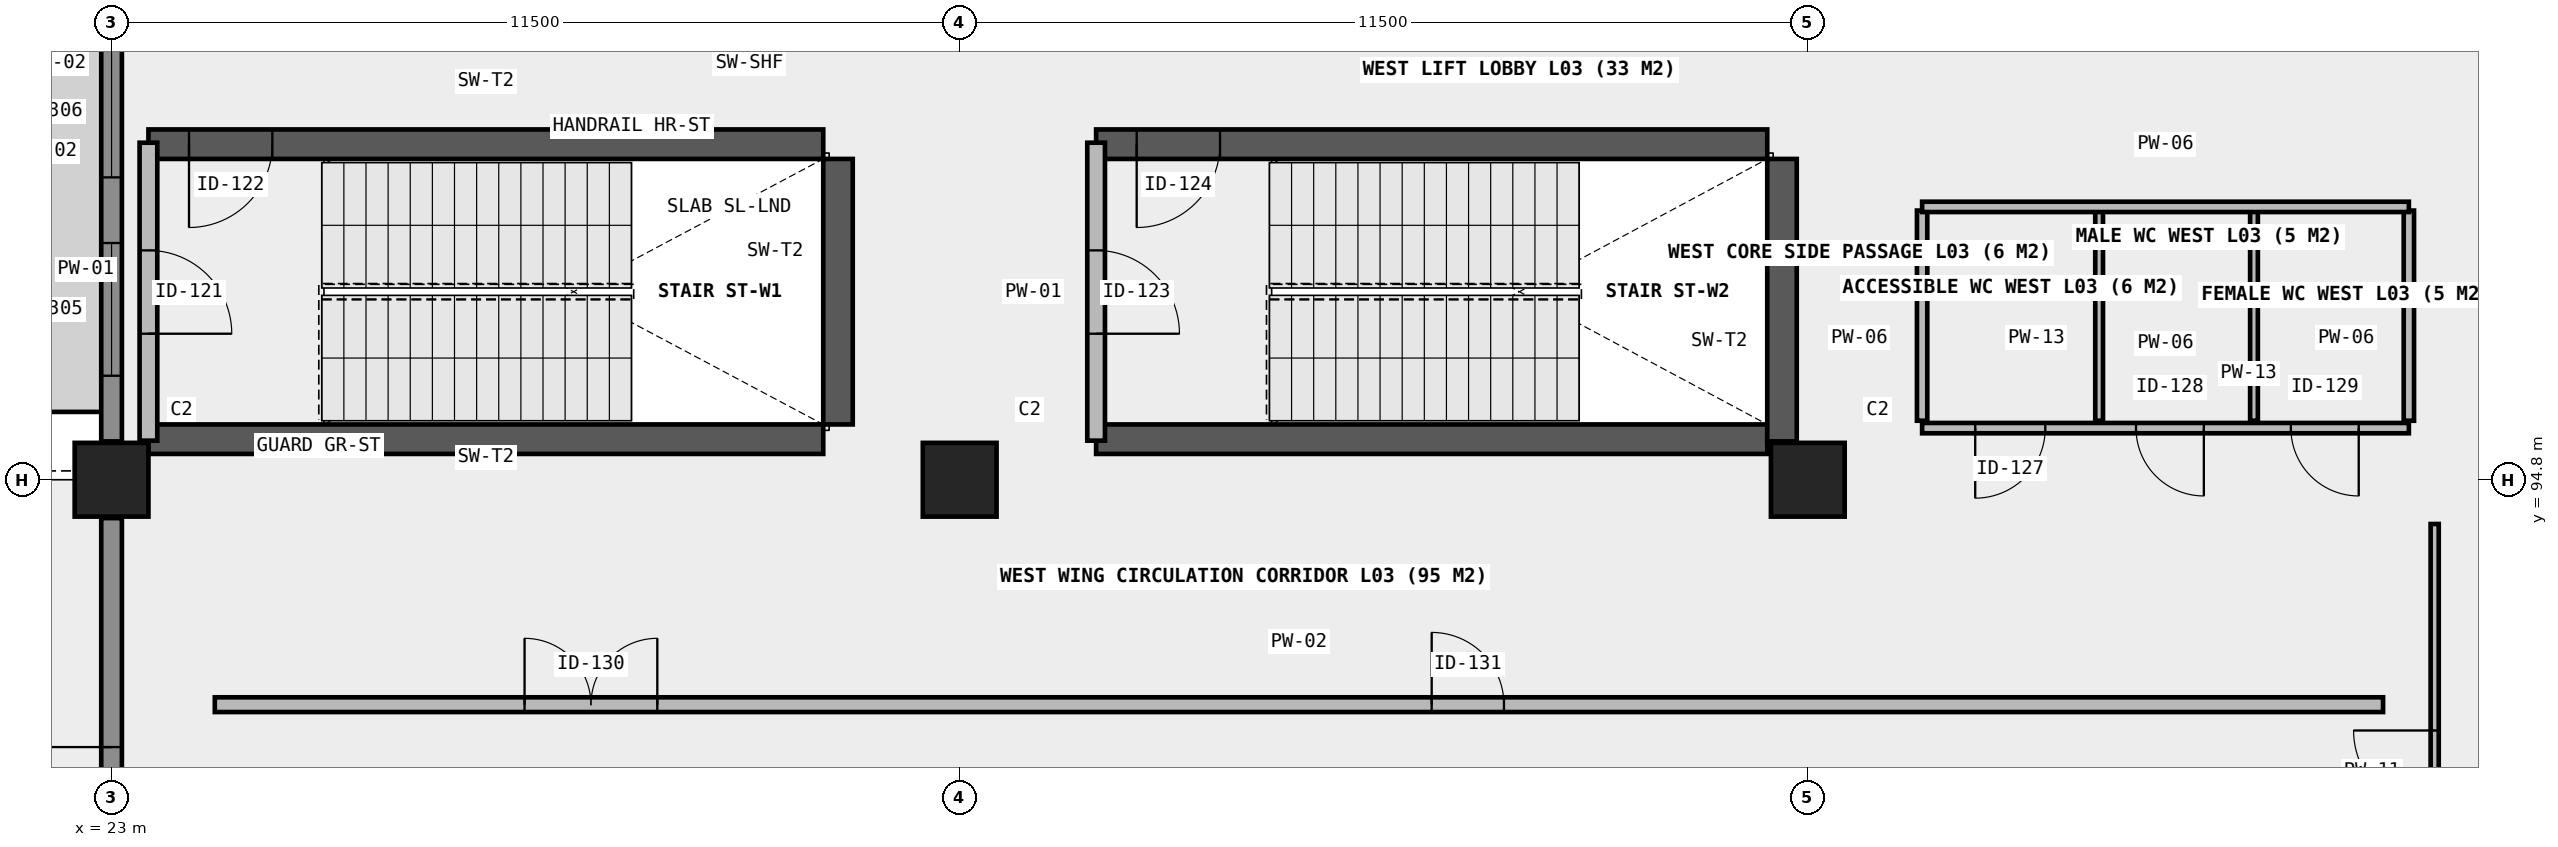
"""IFC4 building model, lengths in metres.
Left out: names, types, materials, properties, quantities, classifications, styles, units other than length and angle.
Written with IfcOpenShell. Run it as: python <this file> out.ifc"""

import sys

from ifc_helpers import new_model, si_unit, direction, frame, frame_2d, origin, origin_2d, place, context, subcontext, project, spatial, rectangle, extrude, element, fill, save


model = new_model("IFC4")
c1 = context("Model", 3, precision=1e-05, world=origin(), true_north=direction((0.0, 1.0)))
c2 = subcontext(c1, "Body", "Model", "MODEL_VIEW")
j1 = project(units=[si_unit("LENGTHUNIT", "METRE"), si_unit("PLANEANGLEUNIT", "RADIAN")], contexts=[c1])
p1 = place(None, origin())
s1 = spatial("IfcSite", under=j1, at=p1, CompositionType="ELEMENT")
p2 = place(p1, origin())
s2 = spatial("IfcBuilding", under=s1, at=p2, CompositionType="ELEMENT")
p3 = place(p2, frame((0.0, 0.0, 13.8)))
s3 = spatial("IfcBuildingStorey", under=s2, at=p3, CompositionType="ELEMENT", Elevation=13.8)
for number, where, z_axis, x_axis in (
    (1, (23.0, 94.8, 0.0), (0.0, 0.0, 1.0), (1.0, 0.0, 0.0)),
    (2, (34.5, 94.8, 0.0), (0.0, 0.0, 1.0), (1.0, 0.0, 0.0)),
    (3, (46.0, 94.8, 0.0), (0.0, 0.0, 1.0), (1.0, 0.0, 0.0)),
):
    element("IfcColumn", number, at=place(p3, frame(where, z_axis=z_axis, x_axis=x_axis)), inside=s3, PredefinedType="COLUMN", context=c2, shape_type="SweptSolid", body=[
        extrude(rectangle(XDim=1.0, YDim=1.0, at=origin_2d()), origin(), (0.0, 0.0, 1.0), 4.5),
    ])
p4 = place(p3, frame((23.5, 95.35, 0.0), z_axis=(0.0, 0.0, 1.0), x_axis=(1.0, 0.0, 0.0)))
e4 = element("IfcWall", 4, at=p4, inside=s3, PredefinedType="SHEAR", context=c2, shape_type="SweptSolid", body=[
    extrude(rectangle(XDim=9.15, YDim=0.4, at=frame_2d((4.575, 0.0))), origin(), (0.0, 0.0, 1.0), 4.5),
])
p5 = place(p3, frame((23.5, 99.35, 0.0), z_axis=(0.0, 0.0, 1.0), x_axis=(1.0, 0.0, 0.0)))
e5 = element("IfcWall", 5, at=p5, inside=s3, PredefinedType="SHEAR", context=c2, shape_type="SweptSolid", body=[
    extrude(rectangle(XDim=9.15, YDim=0.4, at=frame_2d((4.575, 0.0))), origin(), (0.0, 0.0, 1.0), 4.5),
])
p6 = place(p5, frame((0.55, 0.0, 0.0)))
e6 = element("IfcOpeningElement", 6, at=p6, cuts=e5, PredefinedType="OPENING", context=c2, shape_type="SweptSolid", body=[
    extrude(rectangle(XDim=1.13, YDim=2.15, at=frame_2d((0.565, 1.075))), frame((0.0, 0.21, 0.0), z_axis=(0.0, -1.0, 0.0), x_axis=(1.0, 0.0, 0.0)), (0.0, 0.0, 1.0), 0.42),
])
p7 = place(p3, frame((32.85, 95.55, 0.0), z_axis=(0.0, 0.0, 1.0), x_axis=(0.0, 1.0, 0.0)))
e7 = element("IfcWall", 7, at=p7, inside=s3, PredefinedType="SHEAR", context=c2, shape_type="SweptSolid", body=[
    extrude(rectangle(XDim=3.6, YDim=0.4, at=frame_2d((1.8, 0.0))), origin(), (0.0, 0.0, 1.0), 4.5),
])
p8 = place(p3, frame((36.35, 95.35, 0.0), z_axis=(0.0, 0.0, 1.0), x_axis=(1.0, 0.0, 0.0)))
e8 = element("IfcWall", 8, at=p8, inside=s3, PredefinedType="SHEAR", context=c2, shape_type="SweptSolid", body=[
    extrude(rectangle(XDim=9.1, YDim=0.4, at=frame_2d((4.55, 0.0))), origin(), (0.0, 0.0, 1.0), 4.5),
])
p9 = place(p3, frame((36.35, 99.35, 0.0), z_axis=(0.0, 0.0, 1.0), x_axis=(1.0, 0.0, 0.0)))
e9 = element("IfcWall", 9, at=p9, inside=s3, PredefinedType="SHEAR", context=c2, shape_type="SweptSolid", body=[
    extrude(rectangle(XDim=9.1, YDim=0.4, at=frame_2d((4.55, 0.0))), origin(), (0.0, 0.0, 1.0), 4.5),
])
p10 = place(p9, frame((0.55, 0.0, 0.0)))
e10 = element("IfcOpeningElement", 10, at=p10, cuts=e9, PredefinedType="OPENING", context=c2, shape_type="SweptSolid", body=[
    extrude(rectangle(XDim=1.13, YDim=2.15, at=frame_2d((0.565, 1.075))), frame((0.0, 0.21, 0.0), z_axis=(0.0, -1.0, 0.0), x_axis=(1.0, 0.0, 0.0)), (0.0, 0.0, 1.0), 0.42),
])
p11 = place(p3, frame((45.65, 95.32, 0.0), z_axis=(0.0, 0.0, 1.0), x_axis=(0.0, 1.0, 0.0)))
e11 = element("IfcWall", 11, at=p11, inside=s3, PredefinedType="SHEAR", context=c2, shape_type="SweptSolid", body=[
    extrude(rectangle(XDim=3.83, YDim=0.4, at=frame_2d((1.915, 0.0))), origin(), (0.0, 0.0, 1.0), 4.5),
])
p12 = place(p3, frame((23.0, 86.27, 0.0), z_axis=(0.0, 0.0, 1.0), x_axis=(0.0, 1.0, 0.0)))
e12 = element("IfcWall", 12, at=p12, inside=s3, PredefinedType="SOLIDWALL", context=c2, shape_type="SweptSolid", body=[
    extrude(rectangle(XDim=8.01, YDim=0.28, at=frame_2d((4.005, 0.0))), origin(), (0.0, 0.0, 1.0), 3.45),
])
p13 = place(p12, frame((3.105, 0.0, 0.0)))
e13 = element("IfcOpeningElement", 13, at=p13, cuts=e12, PredefinedType="OPENING", context=c2, shape_type="SweptSolid", body=[
    extrude(rectangle(XDim=1.8, YDim=2.25, at=frame_2d((0.9, 1.125))), frame((0.0, 0.15, 0.0), z_axis=(0.0, -1.0, 0.0), x_axis=(1.0, 0.0, 0.0)), (0.0, 0.0, 1.0), 0.3),
])
p14 = place(p3, frame((23.0, 95.32, 0.0), z_axis=(0.0, 0.0, 1.0), x_axis=(0.0, 1.0, 0.0)))
e14 = element("IfcWall", 14, at=p14, inside=s3, PredefinedType="SOLIDWALL", context=c2, shape_type="SweptSolid", body=[
    extrude(rectangle(XDim=8.96, YDim=0.28, at=frame_2d((4.48, 0.0))), origin(), (0.0, 0.0, 1.0), 3.45),
])
p15 = place(p14, frame((0.89, 0.0, 0.85)))
e15 = element("IfcOpeningElement", 15, at=p15, cuts=e14, PredefinedType="OPENING", context=c2, shape_type="SweptSolid", body=[
    extrude(rectangle(XDim=1.8, YDim=1.95, at=frame_2d((0.9, 0.975))), frame((0.0, 0.15, 0.0), z_axis=(0.0, -1.0, 0.0), x_axis=(1.0, 0.0, 0.0)), (0.0, 0.0, 1.0), 0.3),
])
p16 = place(p14, frame((3.58, 0.0, 0.85)))
e16 = element("IfcOpeningElement", 16, at=p16, cuts=e14, PredefinedType="OPENING", context=c2, shape_type="SweptSolid", body=[
    extrude(rectangle(XDim=1.8, YDim=1.95, at=frame_2d((0.9, 0.975))), frame((0.0, 0.15, 0.0), z_axis=(0.0, -1.0, 0.0), x_axis=(1.0, 0.0, 0.0)), (0.0, 0.0, 1.0), 0.3),
])
p17 = place(p14, frame((6.27, 0.0, 0.85)))
e17 = element("IfcOpeningElement", 17, at=p17, cuts=e14, PredefinedType="OPENING", context=c2, shape_type="SweptSolid", body=[
    extrude(rectangle(XDim=1.8, YDim=1.95, at=frame_2d((0.9, 0.975))), frame((0.0, 0.15, 0.0), z_axis=(0.0, -1.0, 0.0), x_axis=(1.0, 0.0, 0.0)), (0.0, 0.0, 1.0), 0.3),
])
p18 = place(p3, frame((23.5, 95.33, 0.0), z_axis=(0.0, 0.0, 1.0), x_axis=(0.0, 1.0, 0.0)))
e18 = element("IfcWall", 18, at=p18, inside=s3, PredefinedType="SOLIDWALL", context=c2, shape_type="SweptSolid", body=[
    extrude(rectangle(XDim=4.04, YDim=0.24, at=frame_2d((2.02, 0.0))), origin(), (0.0, 0.0, 1.0), 4.22),
])
p19 = place(p18, frame((1.45, 0.0, 0.0)))
e19 = element("IfcOpeningElement", 19, at=p19, cuts=e18, PredefinedType="OPENING", context=c2, shape_type="SweptSolid", body=[
    extrude(rectangle(XDim=1.13, YDim=2.15, at=frame_2d((0.565, 1.075))), frame((0.0, 0.13, 0.0), z_axis=(0.0, -1.0, 0.0), x_axis=(1.0, 0.0, 0.0)), (0.0, 0.0, 1.0), 0.26),
])
p20 = place(p3, frame((36.35, 95.33, 0.0), z_axis=(0.0, 0.0, 1.0), x_axis=(0.0, 1.0, 0.0)))
e20 = element("IfcWall", 20, at=p20, inside=s3, PredefinedType="SOLIDWALL", context=c2, shape_type="SweptSolid", body=[
    extrude(rectangle(XDim=4.04, YDim=0.24, at=frame_2d((2.02, 0.0))), origin(), (0.0, 0.0, 1.0), 4.22),
])
p21 = place(p20, frame((1.45, 0.0, 0.0)))
e21 = element("IfcOpeningElement", 21, at=p21, cuts=e20, PredefinedType="OPENING", context=c2, shape_type="SweptSolid", body=[
    extrude(rectangle(XDim=1.13, YDim=2.15, at=frame_2d((0.565, 1.075))), frame((0.0, 0.13, 0.0), z_axis=(0.0, -1.0, 0.0), x_axis=(1.0, 0.0, 0.0)), (0.0, 0.0, 1.0), 0.26),
])
p22 = place(p3, frame((47.55, 95.5, 0.0), z_axis=(0.0, 0.0, 1.0), x_axis=(1.0, 0.0, 0.0)))
e22 = element("IfcWall", 22, at=p22, inside=s3, PredefinedType="PLUMBINGWALL", context=c2, shape_type="SweptSolid", body=[
    extrude(rectangle(XDim=6.6, YDim=0.14, at=frame_2d((3.3, 0.0))), origin(), (0.0, 0.0, 1.0), 4.22),
])
p23 = place(p22, frame((0.72, 0.0, 0.0)))
e23 = element("IfcOpeningElement", 23, at=p23, cuts=e22, PredefinedType="OPENING", context=c2, shape_type="SweptSolid", body=[
    extrude(rectangle(XDim=0.95, YDim=2.1, at=frame_2d((0.475, 1.05))), frame((0.0, 0.08, 0.0), z_axis=(0.0, -1.0, 0.0), x_axis=(1.0, 0.0, 0.0)), (0.0, 0.0, 1.0), 0.16),
])
p24 = place(p22, frame((2.9, 0.0, 0.0)))
e24 = element("IfcOpeningElement", 24, at=p24, cuts=e22, PredefinedType="OPENING", context=c2, shape_type="SweptSolid", body=[
    extrude(rectangle(XDim=0.92, YDim=2.1, at=frame_2d((0.46, 1.05))), frame((0.0, 0.08, 0.0), z_axis=(0.0, -1.0, 0.0), x_axis=(1.0, 0.0, 0.0)), (0.0, 0.0, 1.0), 0.16),
])
p25 = place(p22, frame((5.0, 0.0, 0.0)))
e25 = element("IfcOpeningElement", 25, at=p25, cuts=e22, PredefinedType="OPENING", context=c2, shape_type="SweptSolid", body=[
    extrude(rectangle(XDim=0.92, YDim=2.1, at=frame_2d((0.46, 1.05))), frame((0.0, 0.08, 0.0), z_axis=(0.0, -1.0, 0.0), x_axis=(1.0, 0.0, 0.0)), (0.0, 0.0, 1.0), 0.16),
])
p26 = place(p3, frame((47.55, 95.6, 0.0), z_axis=(0.0, 0.0, 1.0), x_axis=(0.0, 1.0, 0.0)))
e26 = element("IfcWall", 26, at=p26, inside=s3, PredefinedType="PLUMBINGWALL", context=c2, shape_type="SweptSolid", body=[
    extrude(rectangle(XDim=2.85, YDim=0.14, at=frame_2d((1.425, 0.0))), origin(), (0.0, 0.0, 1.0), 4.22),
])
p27 = place(p3, frame((49.95, 95.6, 0.0), z_axis=(0.0, 0.0, 1.0), x_axis=(0.0, 1.0, 0.0)))
e27 = element("IfcWall", 27, at=p27, inside=s3, PredefinedType="PARTITIONING", context=c2, shape_type="SweptSolid", body=[
    extrude(rectangle(XDim=2.85, YDim=0.105, at=frame_2d((1.425, 0.0))), origin(), (0.0, 0.0, 1.0), 3.7),
])
p28 = place(p3, frame((52.05, 95.6, 0.0), z_axis=(0.0, 0.0, 1.0), x_axis=(0.0, 1.0, 0.0)))
e28 = element("IfcWall", 28, at=p28, inside=s3, PredefinedType="PARTITIONING", context=c2, shape_type="SweptSolid", body=[
    extrude(rectangle(XDim=2.85, YDim=0.105, at=frame_2d((1.425, 0.0))), origin(), (0.0, 0.0, 1.0), 4.22),
])
p29 = place(p3, frame((54.15, 95.6, 0.0), z_axis=(0.0, 0.0, 1.0), x_axis=(0.0, 1.0, 0.0)))
e29 = element("IfcWall", 29, at=p29, inside=s3, PredefinedType="PLUMBINGWALL", context=c2, shape_type="SweptSolid", body=[
    extrude(rectangle(XDim=2.85, YDim=0.14, at=frame_2d((1.425, 0.0))), origin(), (0.0, 0.0, 1.0), 4.22),
])
p30 = place(p3, frame((47.55, 98.5, 0.0), z_axis=(0.0, 0.0, 1.0), x_axis=(1.0, 0.0, 0.0)))
e30 = element("IfcWall", 30, at=p30, inside=s3, PredefinedType="PLUMBINGWALL", context=c2, shape_type="SweptSolid", body=[
    extrude(rectangle(XDim=6.6, YDim=0.14, at=frame_2d((3.3, 0.0))), origin(), (0.0, 0.0, 1.0), 4.22),
])
p31 = place(p3, frame((24.4, 91.75, 0.0), z_axis=(0.0, 0.0, 1.0), x_axis=(1.0, 0.0, 0.0)))
e31 = element("IfcWall", 31, at=p31, inside=s3, PredefinedType="PARTITIONING", context=c2, shape_type="SweptSolid", body=[
    extrude(rectangle(XDim=29.4, YDim=0.2, at=frame_2d((14.7, 0.0))), origin(), (0.0, 0.0, 1.0), 4.22),
])
p32 = place(p31, frame((4.2, 0.0, 0.0)))
e32 = element("IfcOpeningElement", 32, at=p32, cuts=e31, PredefinedType="OPENING", context=c2, shape_type="SweptSolid", body=[
    extrude(rectangle(XDim=1.8, YDim=2.2, at=frame_2d((0.9, 1.1))), frame((0.0, 0.11, 0.0), z_axis=(0.0, -1.0, 0.0), x_axis=(1.0, 0.0, 0.0)), (0.0, 0.0, 1.0), 0.22),
])
p33 = place(p31, frame((16.5, 0.0, 0.0)))
e33 = element("IfcOpeningElement", 33, at=p33, cuts=e31, PredefinedType="OPENING", context=c2, shape_type="SweptSolid", body=[
    extrude(rectangle(XDim=0.98, YDim=2.15, at=frame_2d((0.49, 1.075))), frame((0.0, 0.11, 0.0), z_axis=(0.0, -1.0, 0.0), x_axis=(1.0, 0.0, 0.0)), (0.0, 0.0, 1.0), 0.22),
])
p34 = place(p3, frame((54.5, 86.4, 0.0), z_axis=(0.0, 0.0, 1.0), x_axis=(0.0, 1.0, 0.0)))
e34 = element("IfcWall", 34, at=p34, inside=s3, PredefinedType="MOVABLE", context=c2, shape_type="SweptSolid", body=[
    extrude(rectangle(XDim=7.8, YDim=0.11, at=frame_2d((3.9, 0.0))), origin(), (0.0, 0.0, 1.0), 4.22),
])
p35 = place(p34, frame((2.8, 0.0, 0.0)))
e35 = element("IfcOpeningElement", 35, at=p35, cuts=e34, PredefinedType="OPENING", context=c2, shape_type="SweptSolid", body=[
    extrude(rectangle(XDim=2.2, YDim=2.4, at=frame_2d((1.1, 1.2))), frame((0.0, 0.065, 0.0), z_axis=(0.0, -1.0, 0.0), x_axis=(1.0, 0.0, 0.0)), (0.0, 0.0, 1.0), 0.13),
])
p36 = place(p13, origin())
e36 = element("IfcDoor", 36, at=p36, inside=s3, OperationType="DOUBLE_DOOR_SINGLE_SWING", PredefinedType="DOOR", context=c2, shape_type="SweptSolid", body=[
    extrude(rectangle(XDim=1.8, YDim=2.25, at=frame_2d((0.9, 1.125))), frame((0.0, 0.025, 0.0), z_axis=(0.0, -1.0, 0.0), x_axis=(1.0, 0.0, 0.0)), (0.0, 0.0, 1.0), 0.05),
])
fill(e13, e36)
p37 = place(p15, origin())
e37 = element("IfcWindow", 37, at=p37, inside=s3, PartitioningType="SINGLE_PANEL", PredefinedType="WINDOW", context=c2, shape_type="SweptSolid", body=[
    extrude(rectangle(XDim=1.8, YDim=1.95, at=frame_2d((0.9, 0.975))), frame((0.0, 0.03, 0.0), z_axis=(0.0, -1.0, 0.0), x_axis=(1.0, 0.0, 0.0)), (0.0, 0.0, 1.0), 0.06),
])
fill(e15, e37)
p38 = place(p16, origin())
e38 = element("IfcWindow", 38, at=p38, inside=s3, PartitioningType="SINGLE_PANEL", PredefinedType="WINDOW", context=c2, shape_type="SweptSolid", body=[
    extrude(rectangle(XDim=1.8, YDim=1.95, at=frame_2d((0.9, 0.975))), frame((0.0, 0.03, 0.0), z_axis=(0.0, -1.0, 0.0), x_axis=(1.0, 0.0, 0.0)), (0.0, 0.0, 1.0), 0.06),
])
fill(e16, e38)
p39 = place(p19, frame((0.565, 0.0, 0.0), z_axis=(0.0, 0.0, 1.0), x_axis=(-1.0, 0.0, 0.0)))
e39 = element("IfcDoor", 39, at=p39, inside=s3, OperationType="SINGLE_SWING_LEFT", PredefinedType="DOOR", context=c2, shape_type="SweptSolid", body=[
    extrude(rectangle(XDim=1.13, YDim=2.15, at=frame_2d((0.0, 1.075))), frame((0.0, 0.025, 0.0), z_axis=(0.0, -1.0, 0.0), x_axis=(1.0, 0.0, 0.0)), (0.0, 0.0, 1.0), 0.05),
])
fill(e19, e39)
p40 = place(p6, frame((0.565, 0.0, 0.0), z_axis=(0.0, 0.0, 1.0), x_axis=(-1.0, 0.0, 0.0)))
e40 = element("IfcDoor", 40, at=p40, inside=s3, OperationType="SINGLE_SWING_LEFT", PredefinedType="DOOR", context=c2, shape_type="SweptSolid", body=[
    extrude(rectangle(XDim=1.13, YDim=2.15, at=frame_2d((0.0, 1.075))), frame((0.0, 0.025, 0.0), z_axis=(0.0, -1.0, 0.0), x_axis=(1.0, 0.0, 0.0)), (0.0, 0.0, 1.0), 0.05),
])
fill(e6, e40)
p41 = place(p21, frame((0.565, 0.0, 0.0), z_axis=(0.0, 0.0, 1.0), x_axis=(-1.0, 0.0, 0.0)))
e41 = element("IfcDoor", 41, at=p41, inside=s3, OperationType="SINGLE_SWING_LEFT", PredefinedType="DOOR", context=c2, shape_type="SweptSolid", body=[
    extrude(rectangle(XDim=1.13, YDim=2.15, at=frame_2d((0.0, 1.075))), frame((0.0, 0.025, 0.0), z_axis=(0.0, -1.0, 0.0), x_axis=(1.0, 0.0, 0.0)), (0.0, 0.0, 1.0), 0.05),
])
fill(e21, e41)
p42 = place(p10, frame((0.565, 0.0, 0.0), z_axis=(0.0, 0.0, 1.0), x_axis=(-1.0, 0.0, 0.0)))
e42 = element("IfcDoor", 42, at=p42, inside=s3, OperationType="SINGLE_SWING_LEFT", PredefinedType="DOOR", context=c2, shape_type="SweptSolid", body=[
    extrude(rectangle(XDim=1.13, YDim=2.15, at=frame_2d((0.0, 1.075))), frame((0.0, 0.025, 0.0), z_axis=(0.0, -1.0, 0.0), x_axis=(1.0, 0.0, 0.0)), (0.0, 0.0, 1.0), 0.05),
])
fill(e10, e42)
p43 = place(p23, frame((0.475, 0.0, 0.0), z_axis=(0.0, 0.0, 1.0), x_axis=(-1.0, 0.0, 0.0)))
e43 = element("IfcDoor", 43, at=p43, inside=s3, OperationType="SINGLE_SWING_LEFT", PredefinedType="DOOR", context=c2, shape_type="SweptSolid", body=[
    extrude(rectangle(XDim=0.95, YDim=2.1, at=frame_2d((0.0, 1.05))), frame((0.0, 0.025, 0.0), z_axis=(0.0, -1.0, 0.0), x_axis=(1.0, 0.0, 0.0)), (0.0, 0.0, 1.0), 0.05),
])
fill(e23, e43)
p44 = place(p24, origin())
e44 = element("IfcDoor", 44, at=p44, inside=s3, OperationType="SINGLE_SWING_RIGHT", PredefinedType="DOOR", context=c2, shape_type="SweptSolid", body=[
    extrude(rectangle(XDim=0.92, YDim=2.1, at=frame_2d((0.46, 1.05))), frame((0.0, 0.025, 0.0), z_axis=(0.0, -1.0, 0.0), x_axis=(1.0, 0.0, 0.0)), (0.0, 0.0, 1.0), 0.05),
])
fill(e24, e44)
p45 = place(p25, origin())
e45 = element("IfcDoor", 45, at=p45, inside=s3, OperationType="SINGLE_SWING_RIGHT", PredefinedType="DOOR", context=c2, shape_type="SweptSolid", body=[
    extrude(rectangle(XDim=0.92, YDim=2.1, at=frame_2d((0.46, 1.05))), frame((0.0, 0.025, 0.0), z_axis=(0.0, -1.0, 0.0), x_axis=(1.0, 0.0, 0.0)), (0.0, 0.0, 1.0), 0.05),
])
fill(e25, e45)
p46 = place(p32, origin())
e46 = element("IfcDoor", 46, at=p46, inside=s3, OperationType="DOUBLE_DOOR_SINGLE_SWING", PredefinedType="DOOR", context=c2, shape_type="SweptSolid", body=[
    extrude(rectangle(XDim=1.8, YDim=2.2, at=frame_2d((0.9, 1.1))), frame((0.0, 0.025, 0.0), z_axis=(0.0, -1.0, 0.0), x_axis=(1.0, 0.0, 0.0)), (0.0, 0.0, 1.0), 0.05),
])
fill(e32, e46)
p47 = place(p33, origin())
e47 = element("IfcDoor", 47, at=p47, inside=s3, OperationType="SINGLE_SWING_LEFT", PredefinedType="DOOR", context=c2, shape_type="SweptSolid", body=[
    extrude(rectangle(XDim=0.98, YDim=2.15, at=frame_2d((0.49, 1.075))), frame((0.0, 0.025, 0.0), z_axis=(0.0, -1.0, 0.0), x_axis=(1.0, 0.0, 0.0)), (0.0, 0.0, 1.0), 0.05),
])
fill(e33, e47)
p48 = place(p35, origin())
e48 = element("IfcDoor", 48, at=p48, inside=s3, OperationType="DOUBLE_DOOR_SINGLE_SWING", PredefinedType="DOOR", context=c2, shape_type="SweptSolid", body=[
    extrude(rectangle(XDim=2.2, YDim=2.4, at=frame_2d((1.1, 1.2))), frame((0.0, 0.025, 0.0), z_axis=(0.0, -1.0, 0.0), x_axis=(1.0, 0.0, 0.0)), (0.0, 0.0, 1.0), 0.05),
])
fill(e35, e48)
save(model, sys.argv[1])
